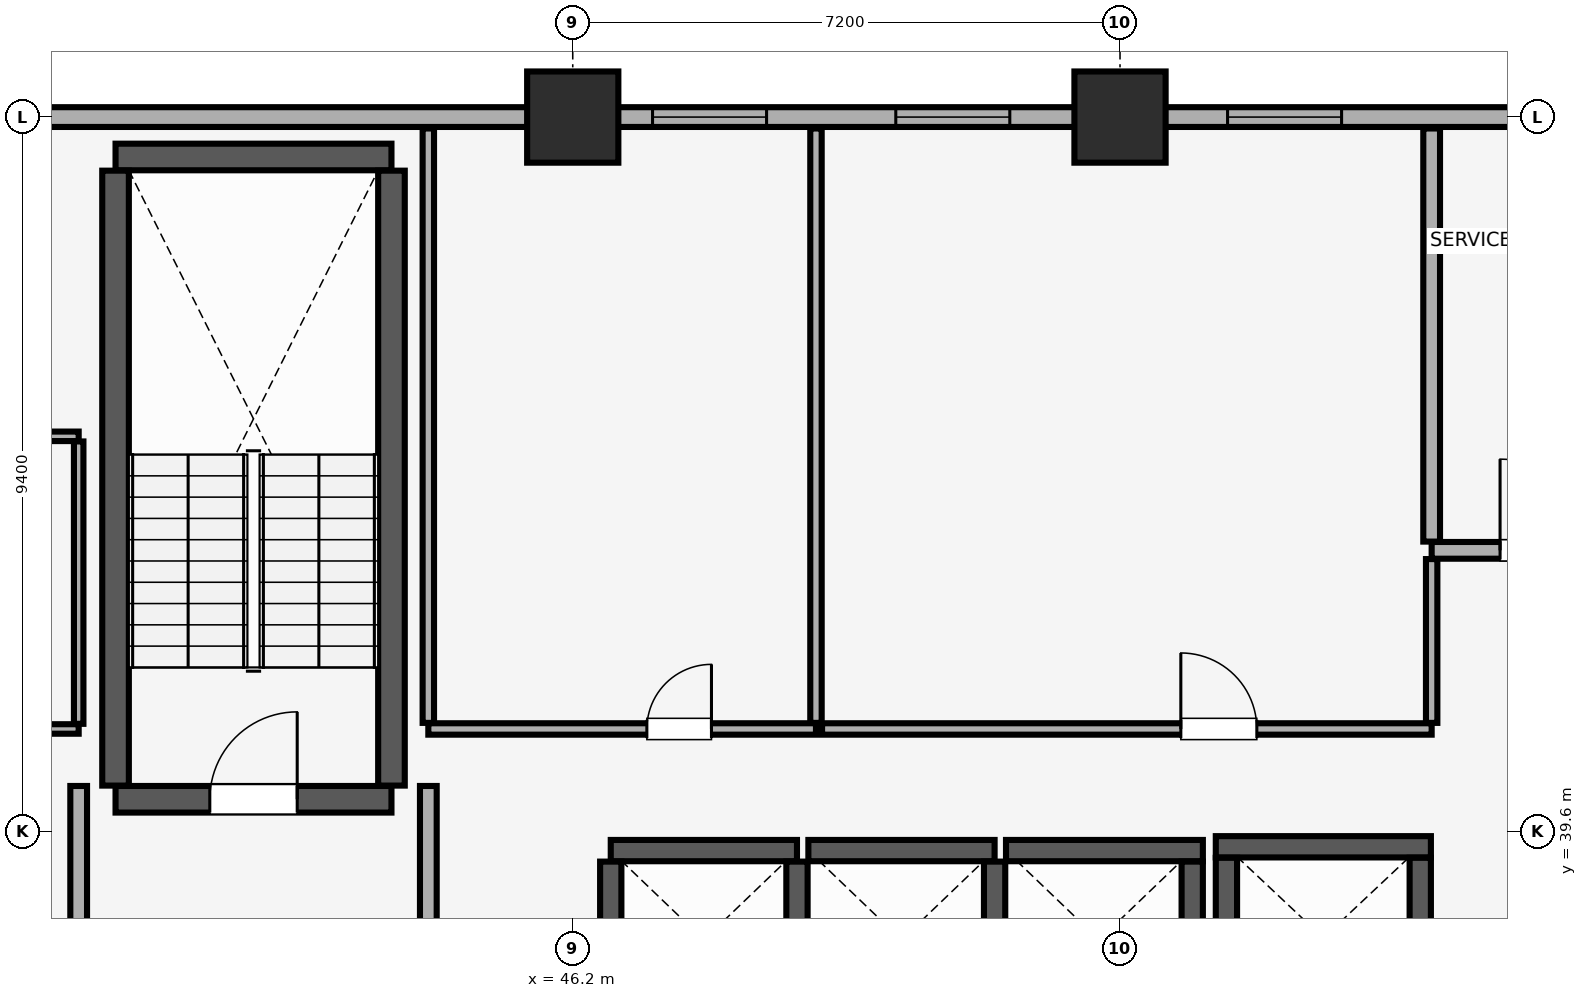
"""IFC4 building model, lengths in metres.
Left out: names, types, materials, properties, quantities, classifications, styles, units other than length and angle.
Written with IfcOpenShell. Run it as: python <this file> out.ifc"""

import sys

from ifc_helpers import new_model, si_unit, direction, frame, frame_2d, origin, origin_2d, place, context, subcontext, project, spatial, rectangle, extrude, element, fill, save


model = new_model("IFC4")
c1 = context("Model", 3, precision=1e-05, world=origin(), true_north=direction((0.0, 1.0)))
c2 = subcontext(c1, "Body", "Model", "MODEL_VIEW")
j1 = project(units=[si_unit("LENGTHUNIT", "METRE"), si_unit("PLANEANGLEUNIT", "RADIAN")], contexts=[c1])
p1 = place(None, origin())
s1 = spatial("IfcSite", under=j1, at=p1, CompositionType="ELEMENT")
p2 = place(p1, origin())
s2 = spatial("IfcBuilding", under=s1, at=p2, CompositionType="ELEMENT")
p3 = place(p2, frame((0.0, 0.0, 93.05)))
s3 = spatial("IfcBuildingStorey", under=s2, at=p3, CompositionType="ELEMENT", Elevation=93.05)
for number, where, z_axis, x_axis in (
    (1, (46.2, 49.0, 0.0), (0.0, 0.0, 1.0), (1.0, 0.0, 0.0)),
    (2, (53.4, 49.0, 0.0), (0.0, 0.0, 1.0), (1.0, 0.0, 0.0)),
):
    element("IfcColumn", number, at=place(p3, frame(where, z_axis=z_axis, x_axis=x_axis)), inside=s3, PredefinedType="COLUMN", context=c2, shape_type="SweptSolid", body=[
        extrude(rectangle(XDim=1.2, YDim=1.2, at=origin_2d()), origin(), (0.0, 0.0, 1.0), 3.51),
    ])
p4 = place(p3, frame((79.8, 49.0, 0.0), z_axis=(0.0, 0.0, 1.0), x_axis=(-1.0, 0.0, 0.0)))
e3 = element("IfcWall", 3, at=p4, inside=s3, PredefinedType="SOLIDWALL", context=c2, shape_type="SweptSolid", body=[
    extrude(rectangle(XDim=75.6, YDim=0.26, at=frame_2d((37.8, 0.0))), origin(), (0.0, 0.0, 1.0), 2.56),
])
p5 = place(p4, frame((72.565, 0.0, 0.85)))
e4 = element("IfcOpeningElement", 4, at=p5, cuts=e3, PredefinedType="OPENING", context=c2, shape_type="SweptSolid", body=[
    extrude(rectangle(XDim=1.5, YDim=1.4, at=frame_2d((0.75, 0.7))), frame((0.0, 0.14, 0.0), z_axis=(0.0, -1.0, 0.0), x_axis=(1.0, 0.0, 0.0)), (0.0, 0.0, 1.0), 0.28),
])
p6 = place(p4, frame((67.45, 0.0, 0.85)))
e5 = element("IfcOpeningElement", 5, at=p6, cuts=e3, PredefinedType="OPENING", context=c2, shape_type="SweptSolid", body=[
    extrude(rectangle(XDim=1.5, YDim=1.4, at=frame_2d((0.75, 0.7))), frame((0.0, 0.14, 0.0), z_axis=(0.0, -1.0, 0.0), x_axis=(1.0, 0.0, 0.0)), (0.0, 0.0, 1.0), 0.28),
])
p7 = place(p4, frame((7.6, 0.0, 0.85)))
e6 = element("IfcOpeningElement", 6, at=p7, cuts=e3, PredefinedType="OPENING", context=c2, shape_type="SweptSolid", body=[
    extrude(rectangle(XDim=1.5, YDim=1.4, at=frame_2d((0.75, 0.7))), frame((0.0, 0.14, 0.0), z_axis=(0.0, -1.0, 0.0), x_axis=(1.0, 0.0, 0.0)), (0.0, 0.0, 1.0), 0.28),
])
p8 = place(p4, frame((1.535, 0.0, 0.85)))
e7 = element("IfcOpeningElement", 7, at=p8, cuts=e3, PredefinedType="OPENING", context=c2, shape_type="SweptSolid", body=[
    extrude(rectangle(XDim=1.5, YDim=1.4, at=frame_2d((0.75, 0.7))), frame((0.0, 0.14, 0.0), z_axis=(0.0, -1.0, 0.0), x_axis=(1.0, 0.0, 0.0)), (0.0, 0.0, 1.0), 0.28),
])
p9 = place(p4, frame((52.265, 0.0, 0.9)))
e8 = element("IfcOpeningElement", 8, at=p9, cuts=e3, PredefinedType="OPENING", context=c2, shape_type="SweptSolid", body=[
    extrude(rectangle(XDim=1.5, YDim=1.4, at=frame_2d((0.75, 0.7))), frame((0.0, 0.14, 0.0), z_axis=(0.0, -1.0, 0.0), x_axis=(1.0, 0.0, 0.0)), (0.0, 0.0, 1.0), 0.28),
])
p10 = place(p4, frame((45.5, 0.0, 0.9)))
e9 = element("IfcOpeningElement", 9, at=p10, cuts=e3, PredefinedType="OPENING", context=c2, shape_type="SweptSolid", body=[
    extrude(rectangle(XDim=1.5, YDim=1.4, at=frame_2d((0.75, 0.7))), frame((0.0, 0.14, 0.0), z_axis=(0.0, -1.0, 0.0), x_axis=(1.0, 0.0, 0.0)), (0.0, 0.0, 1.0), 0.28),
])
p11 = place(p4, frame((31.05, 0.0, 0.9)))
e10 = element("IfcOpeningElement", 10, at=p11, cuts=e3, PredefinedType="OPENING", context=c2, shape_type="SweptSolid", body=[
    extrude(rectangle(XDim=1.5, YDim=1.4, at=frame_2d((0.75, 0.7))), frame((0.0, 0.14, 0.0), z_axis=(0.0, -1.0, 0.0), x_axis=(1.0, 0.0, 0.0)), (0.0, 0.0, 1.0), 0.28),
])
p12 = place(p4, frame((27.85, 0.0, 0.9)))
e11 = element("IfcOpeningElement", 11, at=p12, cuts=e3, PredefinedType="OPENING", context=c2, shape_type="SweptSolid", body=[
    extrude(rectangle(XDim=1.5, YDim=1.4, at=frame_2d((0.75, 0.7))), frame((0.0, 0.14, 0.0), z_axis=(0.0, -1.0, 0.0), x_axis=(1.0, 0.0, 0.0)), (0.0, 0.0, 1.0), 0.28),
])
p13 = place(p4, frame((23.485, 0.0, 0.9)))
e12 = element("IfcOpeningElement", 12, at=p13, cuts=e3, PredefinedType="OPENING", context=c2, shape_type="SweptSolid", body=[
    extrude(rectangle(XDim=1.5, YDim=1.4, at=frame_2d((0.75, 0.7))), frame((0.0, 0.14, 0.0), z_axis=(0.0, -1.0, 0.0), x_axis=(1.0, 0.0, 0.0)), (0.0, 0.0, 1.0), 0.28),
])
p14 = place(p3, frame((40.185, 40.025, 0.0), z_axis=(0.0, 0.0, 1.0), x_axis=(1.0, 0.0, 0.0)))
e13 = element("IfcWall", 13, at=p14, inside=s3, PredefinedType="SHEAR", context=c2, shape_type="SweptSolid", body=[
    extrude(rectangle(XDim=3.63, YDim=0.35, at=frame_2d((1.815, 0.0))), origin(), (0.0, 0.0, 1.0), 3.51),
])
p15 = place(p14, frame((1.24, 0.0, 0.0)))
e14 = element("IfcOpeningElement", 14, at=p15, cuts=e13, PredefinedType="OPENING", context=c2, shape_type="SweptSolid", body=[
    extrude(rectangle(XDim=1.15, YDim=2.15, at=frame_2d((0.575, 1.075))), frame((0.0, 0.185, 0.0), z_axis=(0.0, -1.0, 0.0), x_axis=(1.0, 0.0, 0.0)), (0.0, 0.0, 1.0), 0.37),
])
p16 = place(p3, frame((40.185, 48.475, 0.0), z_axis=(0.0, 0.0, 1.0), x_axis=(1.0, 0.0, 0.0)))
e15 = element("IfcWall", 15, at=p16, inside=s3, PredefinedType="SHEAR", context=c2, shape_type="SweptSolid", body=[
    extrude(rectangle(XDim=3.63, YDim=0.35, at=frame_2d((1.815, 0.0))), origin(), (0.0, 0.0, 1.0), 3.51),
])
for number, where, z_axis, x_axis in (
    (16, (40.185, 40.205, 0.0), (0.0, 0.0, 1.0), (0.0, 1.0, 0.0)),
    (17, (43.815, 40.205, 0.0), (0.0, 0.0, 1.0), (0.0, 1.0, 0.0)),
):
    element("IfcWall", number, at=place(p3, frame(where, z_axis=z_axis, x_axis=x_axis)), inside=s3, PredefinedType="SHEAR", context=c2, shape_type="SweptSolid", body=[
        extrude(rectangle(XDim=8.09, YDim=0.35, at=frame_2d((4.045, 0.0))), origin(), (0.0, 0.0, 1.0), 3.51),
    ])
p17 = place(p3, frame((46.7, 39.35, 0.0), z_axis=(0.0, 0.0, 1.0), x_axis=(1.0, 0.0, 0.0)))
e18 = element("IfcWall", 18, at=p17, inside=s3, PredefinedType="SHEAR", context=c2, shape_type="SweptSolid", body=[
    extrude(rectangle(XDim=2.45, YDim=0.28, at=frame_2d((1.225, 0.0))), origin(), (0.0, 0.0, 1.0), 3.51),
])
for number, where, z_axis, x_axis in (
    (19, (46.7, 37.145, 0.0), (0.0, 0.0, 1.0), (0.0, 1.0, 0.0)),
    (20, (49.15, 37.145, 0.0), (0.0, 0.0, 1.0), (0.0, 1.0, 0.0)),
):
    element("IfcWall", number, at=place(p3, frame(where, z_axis=z_axis, x_axis=x_axis)), inside=s3, PredefinedType="SHEAR", context=c2, shape_type="SweptSolid", body=[
        extrude(rectangle(XDim=2.06, YDim=0.28, at=frame_2d((1.03, 0.0))), origin(), (0.0, 0.0, 1.0), 3.51),
    ])
p18 = place(p3, frame((49.3, 39.35, 0.0), z_axis=(0.0, 0.0, 1.0), x_axis=(1.0, 0.0, 0.0)))
e21 = element("IfcWall", 21, at=p18, inside=s3, PredefinedType="SHEAR", context=c2, shape_type="SweptSolid", body=[
    extrude(rectangle(XDim=2.45, YDim=0.28, at=frame_2d((1.225, 0.0))), origin(), (0.0, 0.0, 1.0), 3.51),
])
p19 = place(p3, frame((51.75, 37.145, 0.0), z_axis=(0.0, 0.0, 1.0), x_axis=(0.0, 1.0, 0.0)))
e22 = element("IfcWall", 22, at=p19, inside=s3, PredefinedType="SHEAR", context=c2, shape_type="SweptSolid", body=[
    extrude(rectangle(XDim=2.06, YDim=0.28, at=frame_2d((1.03, 0.0))), origin(), (0.0, 0.0, 1.0), 3.51),
])
p20 = place(p3, frame((51.9, 39.35, 0.0), z_axis=(0.0, 0.0, 1.0), x_axis=(1.0, 0.0, 0.0)))
e23 = element("IfcWall", 23, at=p20, inside=s3, PredefinedType="SHEAR", context=c2, shape_type="SweptSolid", body=[
    extrude(rectangle(XDim=2.59, YDim=0.28, at=frame_2d((1.295, 0.0))), origin(), (0.0, 0.0, 1.0), 3.51),
])
p21 = place(p3, frame((54.35, 37.145, 0.0), z_axis=(0.0, 0.0, 1.0), x_axis=(0.0, 1.0, 0.0)))
e24 = element("IfcWall", 24, at=p21, inside=s3, PredefinedType="SHEAR", context=c2, shape_type="SweptSolid", body=[
    extrude(rectangle(XDim=2.06, YDim=0.28, at=frame_2d((1.03, 0.0))), origin(), (0.0, 0.0, 1.0), 3.51),
])
p22 = place(p3, frame((54.66, 39.4, 0.0), z_axis=(0.0, 0.0, 1.0), x_axis=(1.0, 0.0, 0.0)))
e25 = element("IfcWall", 25, at=p22, inside=s3, PredefinedType="SHEAR", context=c2, shape_type="SweptSolid", body=[
    extrude(rectangle(XDim=2.83, YDim=0.28, at=frame_2d((1.415, 0.0))), origin(), (0.0, 0.0, 1.0), 3.51),
])
for number, where, z_axis, x_axis in (
    (26, (54.8, 37.145, 0.0), (0.0, 0.0, 1.0), (0.0, 1.0, 0.0)),
    (27, (57.35, 37.145, 0.0), (0.0, 0.0, 1.0), (0.0, 1.0, 0.0)),
):
    element("IfcWall", number, at=place(p3, frame(where, z_axis=z_axis, x_axis=x_axis)), inside=s3, PredefinedType="SHEAR", context=c2, shape_type="SweptSolid", body=[
        extrude(rectangle(XDim=2.11, YDim=0.28, at=frame_2d((1.055, 0.0))), origin(), (0.0, 0.0, 1.0), 3.51),
    ])
for number, where, z_axis, x_axis in (
    (28, (39.7, 34.415, 0.0), (0.0, 0.0, 1.0), (0.0, 1.0, 0.0)),
    (29, (44.3, 34.415, 0.0), (0.0, 0.0, 1.0), (0.0, 1.0, 0.0)),
):
    element("IfcWall", number, at=place(p3, frame(where, z_axis=z_axis, x_axis=x_axis)), inside=s3, PredefinedType="PARTITIONING", context=c2, shape_type="SweptSolid", body=[
        extrude(rectangle(XDim=5.785, YDim=0.22, at=frame_2d((2.893, 0.0))), origin(), (0.0, 0.0, 1.0), 3.51),
    ])
p23 = place(p3, frame((57.5, 43.3, 0.0), z_axis=(0.0, 0.0, 1.0), x_axis=(1.0, 0.0, 0.0)))
e30 = element("IfcWall", 30, at=p23, inside=s3, PredefinedType="PARTITIONING", context=c2, shape_type="SweptSolid", body=[
    extrude(rectangle(XDim=3.04, YDim=0.22, at=frame_2d((1.52, 0.0))), origin(), (0.0, 0.0, 1.0), 3.51),
])
p24 = place(p23, frame((0.9, 0.0, 0.0)))
e31 = element("IfcOpeningElement", 31, at=p24, cuts=e30, PredefinedType="OPENING", context=c2, shape_type="SweptSolid", body=[
    extrude(rectangle(XDim=1.2, YDim=2.15, at=frame_2d((0.6, 1.075))), frame((0.0, 0.12, 0.0), z_axis=(0.0, -1.0, 0.0), x_axis=(1.0, 0.0, 0.0)), (0.0, 0.0, 1.0), 0.24),
])
p25 = place(p3, frame((57.5, 43.415, 0.0), z_axis=(0.0, 0.0, 1.0), x_axis=(0.0, 1.0, 0.0)))
e32 = element("IfcWall", 32, at=p25, inside=s3, PredefinedType="PARTITIONING", context=c2, shape_type="SweptSolid", body=[
    extrude(rectangle(XDim=5.435, YDim=0.22, at=frame_2d((2.718, 0.0))), origin(), (0.0, 0.0, 1.0), 3.51),
])
p26 = place(p3, frame((36.11, 40.95, 0.0), z_axis=(0.0, 0.0, 1.0), x_axis=(1.0, 0.0, 0.0)))
e33 = element("IfcWall", 33, at=p26, inside=s3, PredefinedType="PARTITIONING", context=c2, shape_type="SweptSolid", body=[
    extrude(rectangle(XDim=3.59, YDim=0.125, at=frame_2d((1.795, 0.0))), origin(), (0.0, 0.0, 1.0), 3.51),
])
p27 = place(p26, frame((1.34, 0.0, 0.0)))
e34 = element("IfcOpeningElement", 34, at=p27, cuts=e33, PredefinedType="OPENING", context=c2, shape_type="SweptSolid", body=[
    extrude(rectangle(XDim=0.9, YDim=2.1, at=frame_2d((0.45, 1.05))), frame((0.0, 0.073, 0.0), z_axis=(0.0, -1.0, 0.0), x_axis=(1.0, 0.0, 0.0)), (0.0, 0.0, 1.0), 0.145),
])
p28 = place(p3, frame((36.18, 44.8, 0.0), z_axis=(0.0, 0.0, 1.0), x_axis=(1.0, 0.0, 0.0)))
e35 = element("IfcWall", 35, at=p28, inside=s3, PredefinedType="PARTITIONING", context=c2, shape_type="SweptSolid", body=[
    extrude(rectangle(XDim=3.52, YDim=0.125, at=frame_2d((1.76, 0.0))), origin(), (0.0, 0.0, 1.0), 3.51),
])
p29 = place(p3, frame((39.7, 41.018, 0.0), z_axis=(0.0, 0.0, 1.0), x_axis=(0.0, 1.0, 0.0)))
e36 = element("IfcWall", 36, at=p29, inside=s3, PredefinedType="PARTITIONING", context=c2, shape_type="SweptSolid", body=[
    extrude(rectangle(XDim=3.715, YDim=0.125, at=frame_2d((1.857, 0.0))), origin(), (0.0, 0.0, 1.0), 3.51),
])
p30 = place(p3, frame((44.3, 40.95, 0.0), z_axis=(0.0, 0.0, 1.0), x_axis=(1.0, 0.0, 0.0)))
e37 = element("IfcWall", 37, at=p30, inside=s3, PredefinedType="PARTITIONING", context=c2, shape_type="SweptSolid", body=[
    extrude(rectangle(XDim=5.1, YDim=0.15, at=frame_2d((2.55, 0.0))), origin(), (0.0, 0.0, 1.0), 3.51),
])
p31 = place(p30, frame((2.875, 0.0, 0.0)))
e38 = element("IfcOpeningElement", 38, at=p31, cuts=e37, PredefinedType="OPENING", context=c2, shape_type="SweptSolid", body=[
    extrude(rectangle(XDim=0.85, YDim=2.1, at=frame_2d((0.425, 1.05))), frame((0.0, 0.085, 0.0), z_axis=(0.0, -1.0, 0.0), x_axis=(1.0, 0.0, 0.0)), (0.0, 0.0, 1.0), 0.17),
])
for number, where, z_axis, x_axis in (
    (39, (44.3, 41.03, 0.0), (0.0, 0.0, 1.0), (0.0, 1.0, 0.0)),
    (40, (49.4, 41.03, 0.0), (0.0, 0.0, 1.0), (0.0, 1.0, 0.0)),
):
    element("IfcWall", number, at=place(p3, frame(where, z_axis=z_axis, x_axis=x_axis)), inside=s3, PredefinedType="PARTITIONING", context=c2, shape_type="SweptSolid", body=[
        extrude(rectangle(XDim=7.82, YDim=0.15, at=frame_2d((3.91, 0.0))), origin(), (0.0, 0.0, 1.0), 3.51),
    ])
p32 = place(p3, frame((49.48, 40.95, 0.0), z_axis=(0.0, 0.0, 1.0), x_axis=(1.0, 0.0, 0.0)))
e41 = element("IfcWall", 41, at=p32, inside=s3, PredefinedType="PARTITIONING", context=c2, shape_type="SweptSolid", body=[
    extrude(rectangle(XDim=8.02, YDim=0.15, at=frame_2d((4.01, 0.0))), origin(), (0.0, 0.0, 1.0), 3.51),
])
p33 = place(p32, frame((4.72, 0.0, 0.0)))
e42 = element("IfcOpeningElement", 42, at=p33, cuts=e41, PredefinedType="OPENING", context=c2, shape_type="SweptSolid", body=[
    extrude(rectangle(XDim=1.0, YDim=2.15, at=frame_2d((0.5, 1.075))), frame((0.0, 0.085, 0.0), z_axis=(0.0, -1.0, 0.0), x_axis=(1.0, 0.0, 0.0)), (0.0, 0.0, 1.0), 0.17),
])
p34 = place(p3, frame((57.5, 41.03, 0.0), z_axis=(0.0, 0.0, 1.0), x_axis=(0.0, 1.0, 0.0)))
e43 = element("IfcWall", 43, at=p34, inside=s3, PredefinedType="PARTITIONING", context=c2, shape_type="SweptSolid", body=[
    extrude(rectangle(XDim=2.155, YDim=0.15, at=frame_2d((1.078, 0.0))), origin(), (0.0, 0.0, 1.0), 3.51),
])
p35 = place(p11, origin())
e44 = element("IfcWindow", 44, at=p35, inside=s3, PartitioningType="SINGLE_PANEL", PredefinedType="WINDOW", context=c2, shape_type="SweptSolid", body=[
    extrude(rectangle(XDim=1.5, YDim=1.4, at=frame_2d((0.75, 0.7))), frame((0.0, 0.03, 0.0), z_axis=(0.0, -1.0, 0.0), x_axis=(1.0, 0.0, 0.0)), (0.0, 0.0, 1.0), 0.06),
])
fill(e10, e44)
p36 = place(p12, origin())
e45 = element("IfcWindow", 45, at=p36, inside=s3, PartitioningType="SINGLE_PANEL", PredefinedType="WINDOW", context=c2, shape_type="SweptSolid", body=[
    extrude(rectangle(XDim=1.5, YDim=1.4, at=frame_2d((0.75, 0.7))), frame((0.0, 0.03, 0.0), z_axis=(0.0, -1.0, 0.0), x_axis=(1.0, 0.0, 0.0)), (0.0, 0.0, 1.0), 0.06),
])
fill(e11, e45)
p37 = place(p13, origin())
e46 = element("IfcWindow", 46, at=p37, inside=s3, PartitioningType="SINGLE_PANEL", PredefinedType="WINDOW", context=c2, shape_type="SweptSolid", body=[
    extrude(rectangle(XDim=1.5, YDim=1.4, at=frame_2d((0.75, 0.7))), frame((0.0, 0.03, 0.0), z_axis=(0.0, -1.0, 0.0), x_axis=(1.0, 0.0, 0.0)), (0.0, 0.0, 1.0), 0.06),
])
fill(e12, e46)
p38 = place(p15, origin())
e47 = element("IfcDoor", 47, at=p38, inside=s3, OperationType="SINGLE_SWING_RIGHT", PredefinedType="DOOR", context=c2, shape_type="SweptSolid", body=[
    extrude(rectangle(XDim=1.15, YDim=2.15, at=frame_2d((0.575, 1.075))), frame((0.0, 0.025, 0.0), z_axis=(0.0, -1.0, 0.0), x_axis=(1.0, 0.0, 0.0)), (0.0, 0.0, 1.0), 0.05),
])
fill(e14, e47)
p39 = place(p24, origin())
e48 = element("IfcDoor", 48, at=p39, inside=s3, OperationType="SINGLE_SWING_LEFT", PredefinedType="DOOR", context=c2, shape_type="SweptSolid", body=[
    extrude(rectangle(XDim=1.2, YDim=2.15, at=frame_2d((0.6, 1.075))), frame((0.0, 0.025, 0.0), z_axis=(0.0, -1.0, 0.0), x_axis=(1.0, 0.0, 0.0)), (0.0, 0.0, 1.0), 0.05),
])
fill(e31, e48)
p40 = place(p31, origin())
e49 = element("IfcDoor", 49, at=p40, inside=s3, OperationType="SINGLE_SWING_RIGHT", PredefinedType="DOOR", context=c2, shape_type="SweptSolid", body=[
    extrude(rectangle(XDim=0.85, YDim=2.1, at=frame_2d((0.425, 1.05))), frame((0.0, 0.025, 0.0), z_axis=(0.0, -1.0, 0.0), x_axis=(1.0, 0.0, 0.0)), (0.0, 0.0, 1.0), 0.05),
])
fill(e38, e49)
p41 = place(p33, origin())
e50 = element("IfcDoor", 50, at=p41, inside=s3, OperationType="SINGLE_SWING_LEFT", PredefinedType="DOOR", context=c2, shape_type="SweptSolid", body=[
    extrude(rectangle(XDim=1.0, YDim=2.15, at=frame_2d((0.5, 1.075))), frame((0.0, 0.025, 0.0), z_axis=(0.0, -1.0, 0.0), x_axis=(1.0, 0.0, 0.0)), (0.0, 0.0, 1.0), 0.05),
])
fill(e42, e50)
save(model, sys.argv[1])
